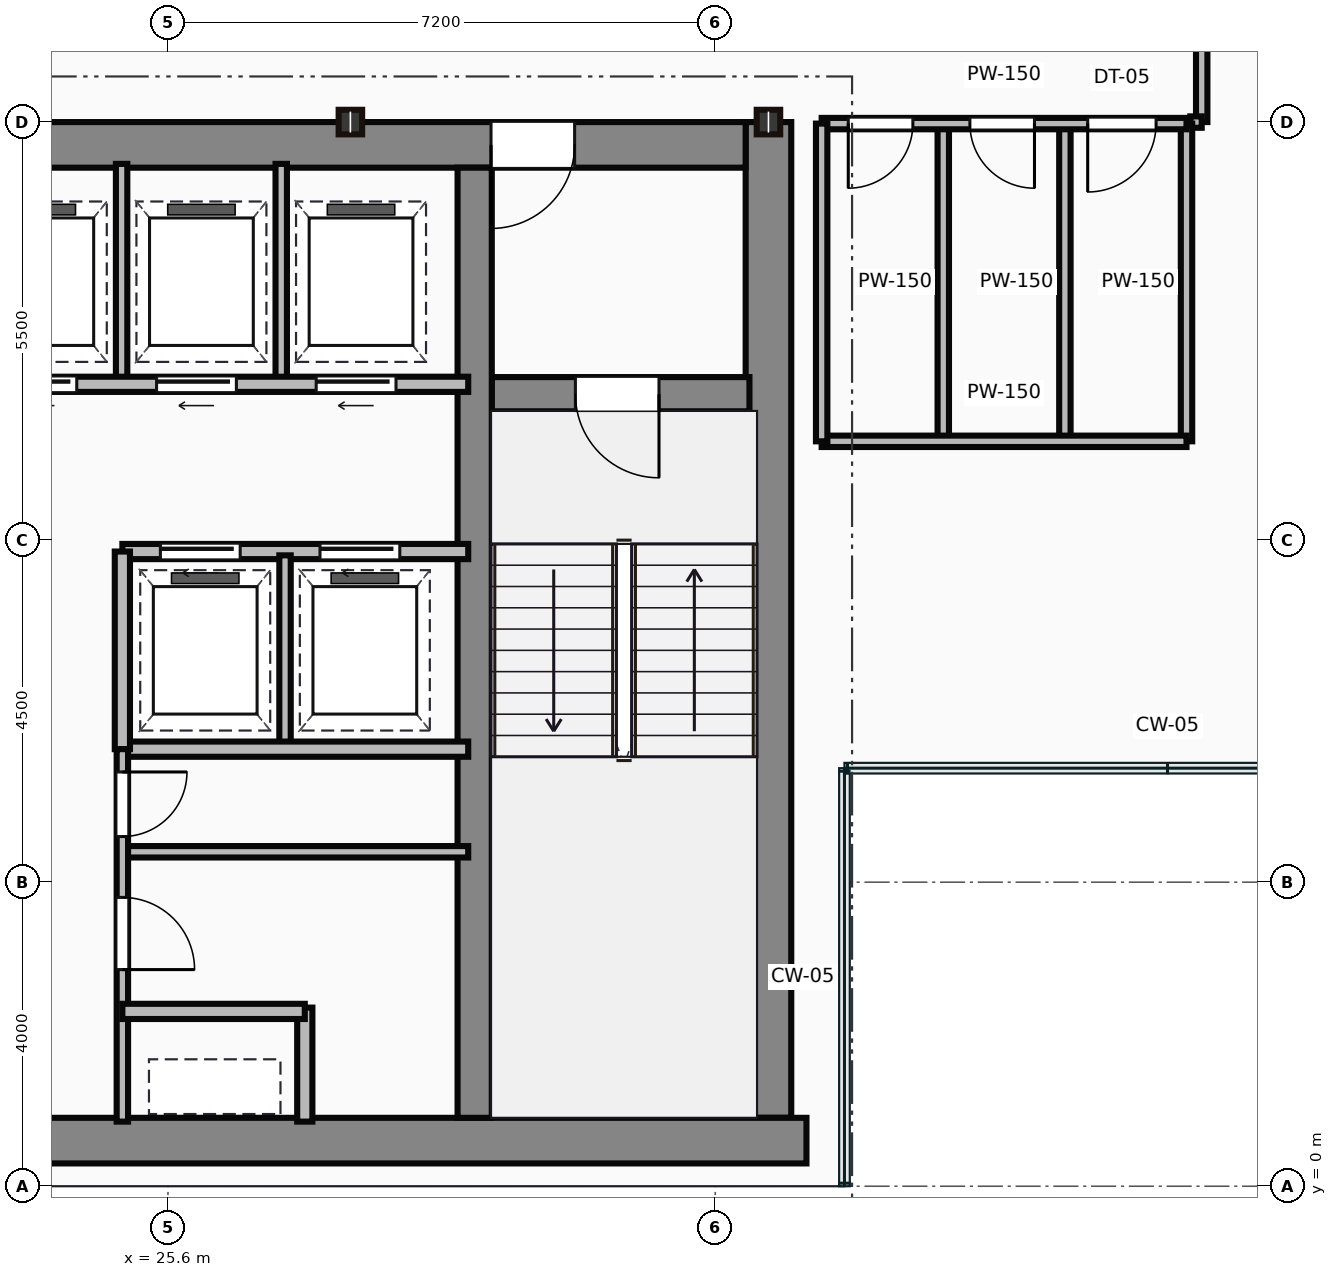
"""IFC4 building model, lengths in metres.
Left out: names, types, materials, properties, quantities, classifications, styles, units other than length and angle.
Written with IfcOpenShell. Run it as: python <this file> out.ifc"""

import sys

from ifc_helpers import new_model, si_unit, direction, frame, frame_2d, origin, origin_2d, place, context, subcontext, project, spatial, rectangle, i_section, extrude, source, transform, mapped, element, fill, save


model = new_model("IFC4")
c1 = context("Model", 3, precision=1e-05, world=origin(), true_north=direction((0.0, 1.0)))
c2 = subcontext(c1, "Body", "Model", "MODEL_VIEW")
j1 = project(units=[si_unit("LENGTHUNIT", "METRE"), si_unit("PLANEANGLEUNIT", "RADIAN")], contexts=[c1])
p1 = place(None, origin())
s1 = spatial("IfcSite", under=j1, at=p1, CompositionType="ELEMENT")
p2 = place(p1, origin())
s2 = spatial("IfcBuilding", under=s1, at=p2, CompositionType="ELEMENT")
p3 = place(p2, frame((0.0, 0.0, 214.15)))
s3 = spatial("IfcBuildingStorey", under=s2, at=p3, CompositionType="ELEMENT", Elevation=214.15)
m1 = source(origin(), c2, "Body", "SweptSolid", [
    extrude(rectangle(XDim=29.5, YDim=0.6, at=frame_2d((14.75, 0.0))), origin(), (0.0, 0.0, 1.0), 3.65),
])
p4 = place(p3, frame((4.5, 0.6, 0.0), z_axis=(0.0, 0.0, 1.0), x_axis=(1.0, 0.0, 0.0)))
e1 = element("IfcWall", 1, at=p4, inside=s3, PredefinedType="SHEAR", context=c2, shape_type="MappedRepresentation", body=[
    mapped(m1, transform((0.0, 0.0, 0.0))),
])
m2 = source(origin(), c2, "Body", "SweptSolid", [
    extrude(rectangle(XDim=13.1, YDim=0.6, at=frame_2d((6.55, 0.0))), origin(), (0.0, 0.0, 1.0), 3.65),
])
p5 = place(p3, frame((33.5, 0.9, 0.0), z_axis=(0.0, 0.0, 1.0), x_axis=(0.0, 1.0, 0.0)))
e2 = element("IfcWall", 2, at=p5, inside=s3, PredefinedType="SHEAR", context=c2, shape_type="MappedRepresentation", body=[
    mapped(m2, transform((0.0, 0.0, 0.0))),
])
m3 = source(origin(), c2, "Body", "SweptSolid", [
    extrude(rectangle(XDim=12.6, YDim=0.6, at=frame_2d((6.3, 0.0))), origin(), (0.0, 0.0, 1.0), 3.65),
])
p6 = place(p3, frame((20.6, 13.7, 0.0), z_axis=(0.0, 0.0, 1.0), x_axis=(1.0, 0.0, 0.0)))
e3 = element("IfcWall", 3, at=p6, inside=s3, PredefinedType="SHEAR", context=c2, shape_type="MappedRepresentation", body=[
    mapped(m3, transform((0.0, 0.0, 0.0))),
])
p7 = place(p6, frame((9.25, 0.0, 0.0)))
e4 = element("IfcOpeningElement", 4, at=p7, cuts=e3, PredefinedType="OPENING", context=c2, shape_type="SweptSolid", body=[
    extrude(rectangle(XDim=1.1, YDim=2.15, at=frame_2d((0.55, 1.075))), frame((0.0, 0.31, 0.0), z_axis=(0.0, -1.0, 0.0), x_axis=(1.0, 0.0, 0.0)), (0.0, 0.0, 1.0), 0.62),
])
m4 = source(origin(), c2, "Body", "SweptSolid", [
    extrude(rectangle(XDim=12.5, YDim=0.45, at=frame_2d((6.25, 0.0))), origin(), (0.0, 0.0, 1.0), 3.65),
])
p8 = place(p3, frame((29.635, 0.9, 0.0), z_axis=(0.0, 0.0, 1.0), x_axis=(0.0, 1.0, 0.0)))
e5 = element("IfcWall", 5, at=p8, inside=s3, PredefinedType="SHEAR", context=c2, shape_type="MappedRepresentation", body=[
    mapped(m4, transform((0.0, 0.0, 0.0))),
])
m5 = source(origin(), c2, "Body", "SweptSolid", [
    extrude(rectangle(XDim=3.39, YDim=0.45, at=frame_2d((1.695, 0.0))), origin(), (0.0, 0.0, 1.0), 3.65),
])
p9 = place(p3, frame((29.86, 10.42, 0.0), z_axis=(0.0, 0.0, 1.0), x_axis=(1.0, 0.0, 0.0)))
e6 = element("IfcWall", 6, at=p9, inside=s3, PredefinedType="SHEAR", context=c2, shape_type="MappedRepresentation", body=[
    mapped(m5, transform((0.0, 0.0, 0.0))),
])
p10 = place(p9, frame((1.1, 0.0, 0.0)))
e7 = element("IfcOpeningElement", 7, at=p10, cuts=e6, PredefinedType="OPENING", context=c2, shape_type="SweptSolid", body=[
    extrude(rectangle(XDim=1.1, YDim=2.15, at=frame_2d((0.55, 1.075))), frame((0.0, 0.235, 0.0), z_axis=(0.0, -1.0, 0.0), x_axis=(1.0, 0.0, 0.0)), (0.0, 0.0, 1.0), 0.47),
])
m6 = source(origin(), c2, "Body", "SweptSolid", [
    extrude(i_section(OverallWidth=0.309, OverallDepth=0.323, WebThickness=0.014, FlangeThickness=0.023, at=origin_2d()), origin(), (0.0, 0.0, 1.0), 3.65),
])
for number, where, z_axis, x_axis in (
    (8, (28.0, 14.0, 0.0), (0.0, 0.0, 1.0), (1.0, 0.0, 0.0)),
    (9, (33.5, 14.0, 0.0), (0.0, 0.0, 1.0), (1.0, 0.0, 0.0)),
):
    element("IfcColumn", number, at=place(p3, frame(where, z_axis=z_axis, x_axis=x_axis)), inside=s3, PredefinedType="COLUMN", context=c2, shape_type="MappedRepresentation", body=[
        mapped(m6, transform((0.0, 0.0, 0.0))),
    ])
m7 = source(origin(), c2, "Body", "SweptSolid", [
    extrude(rectangle(XDim=8.8, YDim=0.2, at=frame_2d((4.4, 0.0))), origin(), (0.0, 0.0, 1.0), 3.4),
])
p11 = place(p3, frame((20.75, 10.55, 0.0), z_axis=(0.0, 0.0, 1.0), x_axis=(1.0, 0.0, 0.0)))
e10 = element("IfcWall", 10, at=p11, inside=s3, PredefinedType="PARTITIONING", context=c2, shape_type="MappedRepresentation", body=[
    mapped(m7, transform((0.0, 0.0, 0.0))),
])
p12 = place(p11, frame((0.5, 0.0, 0.0)))
e11 = element("IfcOpeningElement", 11, at=p12, cuts=e10, PredefinedType="OPENING", context=c2, shape_type="SweptSolid", body=[
    extrude(rectangle(XDim=1.05, YDim=2.15, at=frame_2d((0.525, 1.075))), frame((0.0, 0.11, 0.0), z_axis=(0.0, -1.0, 0.0), x_axis=(1.0, 0.0, 0.0)), (0.0, 0.0, 1.0), 0.22),
])
p13 = place(p11, frame((2.6, 0.0, 0.0)))
e12 = element("IfcOpeningElement", 12, at=p13, cuts=e10, PredefinedType="OPENING", context=c2, shape_type="SweptSolid", body=[
    extrude(rectangle(XDim=1.05, YDim=2.15, at=frame_2d((0.525, 1.075))), frame((0.0, 0.11, 0.0), z_axis=(0.0, -1.0, 0.0), x_axis=(1.0, 0.0, 0.0)), (0.0, 0.0, 1.0), 0.22),
])
p14 = place(p11, frame((4.7, 0.0, 0.0)))
e13 = element("IfcOpeningElement", 13, at=p14, cuts=e10, PredefinedType="OPENING", context=c2, shape_type="SweptSolid", body=[
    extrude(rectangle(XDim=1.05, YDim=2.15, at=frame_2d((0.525, 1.075))), frame((0.0, 0.11, 0.0), z_axis=(0.0, -1.0, 0.0), x_axis=(1.0, 0.0, 0.0)), (0.0, 0.0, 1.0), 0.22),
])
p15 = place(p11, frame((6.8, 0.0, 0.0)))
e14 = element("IfcOpeningElement", 14, at=p15, cuts=e10, PredefinedType="OPENING", context=c2, shape_type="SweptSolid", body=[
    extrude(rectangle(XDim=1.05, YDim=2.15, at=frame_2d((0.525, 1.075))), frame((0.0, 0.11, 0.0), z_axis=(0.0, -1.0, 0.0), x_axis=(1.0, 0.0, 0.0)), (0.0, 0.0, 1.0), 0.22),
])
m8 = source(origin(), c2, "Body", "SweptSolid", [
    extrude(rectangle(XDim=2.85, YDim=0.15, at=frame_2d((1.425, 0.0))), origin(), (0.0, 0.0, 1.0), 3.4),
])
for number, where, z_axis, x_axis in (
    (15, (24.99, 10.6, 0.0), (0.0, 0.0, 1.0), (0.0, 1.0, 0.0)),
    (16, (27.09, 10.6, 0.0), (0.0, 0.0, 1.0), (0.0, 1.0, 0.0)),
):
    element("IfcWall", number, at=place(p3, frame(where, z_axis=z_axis, x_axis=x_axis)), inside=s3, PredefinedType="PARTITIONING", context=c2, shape_type="MappedRepresentation", body=[
        mapped(m8, transform((0.0, 0.0, 0.0))),
    ])
m9 = source(origin(), c2, "Body", "SweptSolid", [
    extrude(rectangle(XDim=4.55, YDim=0.2, at=frame_2d((2.275, 0.0))), origin(), (0.0, 0.0, 1.0), 3.4),
])
p16 = place(p3, frame((25.0, 8.35, 0.0), z_axis=(0.0, 0.0, 1.0), x_axis=(1.0, 0.0, 0.0)))
e17 = element("IfcWall", 17, at=p16, inside=s3, PredefinedType="PARTITIONING", context=c2, shape_type="MappedRepresentation", body=[
    mapped(m9, transform((0.0, 0.0, 0.0))),
])
p17 = place(p16, frame((0.5, 0.0, 0.0)))
e18 = element("IfcOpeningElement", 18, at=p17, cuts=e17, PredefinedType="OPENING", context=c2, shape_type="SweptSolid", body=[
    extrude(rectangle(XDim=1.05, YDim=2.15, at=frame_2d((0.525, 1.075))), frame((0.0, 0.11, 0.0), z_axis=(0.0, -1.0, 0.0), x_axis=(1.0, 0.0, 0.0)), (0.0, 0.0, 1.0), 0.22),
])
p18 = place(p16, frame((2.6, 0.0, 0.0)))
e19 = element("IfcOpeningElement", 19, at=p18, cuts=e17, PredefinedType="OPENING", context=c2, shape_type="SweptSolid", body=[
    extrude(rectangle(XDim=1.05, YDim=2.15, at=frame_2d((0.525, 1.075))), frame((0.0, 0.11, 0.0), z_axis=(0.0, -1.0, 0.0), x_axis=(1.0, 0.0, 0.0)), (0.0, 0.0, 1.0), 0.22),
])
p19 = place(p3, frame((25.0, 5.75, 0.0), z_axis=(0.0, 0.0, 1.0), x_axis=(1.0, 0.0, 0.0)))
e20 = element("IfcWall", 20, at=p19, inside=s3, PredefinedType="PARTITIONING", context=c2, shape_type="MappedRepresentation", body=[
    mapped(m9, transform((0.0, 0.0, 0.0))),
])
m10 = source(origin(), c2, "Body", "SweptSolid", [
    extrude(rectangle(XDim=2.6, YDim=0.2, at=frame_2d((1.3, 0.0))), origin(), (0.0, 0.0, 1.0), 3.4),
])
p20 = place(p3, frame((25.0, 5.75, 0.0), z_axis=(0.0, 0.0, 1.0), x_axis=(0.0, 1.0, 0.0)))
e21 = element("IfcWall", 21, at=p20, inside=s3, PredefinedType="PARTITIONING", context=c2, shape_type="MappedRepresentation", body=[
    mapped(m10, transform((0.0, 0.0, 0.0))),
])
m11 = source(origin(), c2, "Body", "SweptSolid", [
    extrude(rectangle(XDim=2.5, YDim=0.15, at=frame_2d((1.25, 0.0))), origin(), (0.0, 0.0, 1.0), 3.4),
])
p21 = place(p3, frame((27.14, 5.8, 0.0), z_axis=(0.0, 0.0, 1.0), x_axis=(0.0, 1.0, 0.0)))
e22 = element("IfcWall", 22, at=p21, inside=s3, PredefinedType="PARTITIONING", context=c2, shape_type="MappedRepresentation", body=[
    mapped(m11, transform((0.0, 0.0, 0.0))),
])
m12 = source(origin(), c2, "Body", "SweptSolid", [
    extrude(rectangle(XDim=4.9, YDim=0.15, at=frame_2d((2.45, 0.0))), origin(), (0.0, 0.0, 1.0), 3.4),
])
p22 = place(p3, frame((25.0, 0.85, 0.0), z_axis=(0.0, 0.0, 1.0), x_axis=(0.0, 1.0, 0.0)))
e23 = element("IfcWall", 23, at=p22, inside=s3, PredefinedType="PARTITIONING", context=c2, shape_type="MappedRepresentation", body=[
    mapped(m12, transform((0.0, 0.0, 0.0))),
])
p23 = place(p22, frame((2.0, 0.0, 0.0)))
e24 = element("IfcOpeningElement", 24, at=p23, cuts=e23, PredefinedType="OPENING", context=c2, shape_type="SweptSolid", body=[
    extrude(rectangle(XDim=0.95, YDim=2.15, at=frame_2d((0.475, 1.075))), frame((0.0, 0.085, 0.0), z_axis=(0.0, -1.0, 0.0), x_axis=(1.0, 0.0, 0.0)), (0.0, 0.0, 1.0), 0.17),
])
p24 = place(p22, frame((3.75, 0.0, 0.0)))
e25 = element("IfcOpeningElement", 25, at=p24, cuts=e23, PredefinedType="OPENING", context=c2, shape_type="SweptSolid", body=[
    extrude(rectangle(XDim=0.85, YDim=2.15, at=frame_2d((0.425, 1.075))), frame((0.0, 0.085, 0.0), z_axis=(0.0, -1.0, 0.0), x_axis=(1.0, 0.0, 0.0)), (0.0, 0.0, 1.0), 0.17),
])
m13 = source(origin(), c2, "Body", "SweptSolid", [
    extrude(rectangle(XDim=2.4, YDim=0.2, at=frame_2d((1.2, 0.0))), origin(), (0.0, 0.0, 1.0), 3.4),
])
p25 = place(p3, frame((25.0, 2.3, 0.0), z_axis=(0.0, 0.0, 1.0), x_axis=(1.0, 0.0, 0.0)))
e26 = element("IfcWall", 26, at=p25, inside=s3, PredefinedType="PARTITIONING", context=c2, shape_type="MappedRepresentation", body=[
    mapped(m13, transform((0.0, 0.0, 0.0))),
])
m14 = source(origin(), c2, "Body", "SweptSolid", [
    extrude(rectangle(XDim=1.5, YDim=0.2, at=frame_2d((0.75, 0.0))), origin(), (0.0, 0.0, 1.0), 3.4),
])
p26 = place(p3, frame((27.4, 0.85, 0.0), z_axis=(0.0, 0.0, 1.0), x_axis=(0.0, 1.0, 0.0)))
e27 = element("IfcWall", 27, at=p26, inside=s3, PredefinedType="PARTITIONING", context=c2, shape_type="MappedRepresentation", body=[
    mapped(m14, transform((0.0, 0.0, 0.0))),
])
m15 = source(origin(), c2, "Body", "SweptSolid", [
    extrude(rectangle(XDim=4.55, YDim=0.15, at=frame_2d((2.275, 0.0))), origin(), (0.0, 0.0, 1.0), 3.4),
])
p27 = place(p3, frame((25.0, 4.4, 0.0), z_axis=(0.0, 0.0, 1.0), x_axis=(1.0, 0.0, 0.0)))
e28 = element("IfcWall", 28, at=p27, inside=s3, PredefinedType="PARTITIONING", context=c2, shape_type="MappedRepresentation", body=[
    mapped(m15, transform((0.0, 0.0, 0.0))),
])
m16 = source(origin(), c2, "Body", "SweptSolid", [
    extrude(rectangle(XDim=4.8, YDim=0.15, at=frame_2d((2.4, 0.0))), origin(), (0.0, 0.0, 1.0), 2.787),
])
p28 = place(p3, frame((34.2, 13.98, 0.0), z_axis=(0.0, 0.0, 1.0), x_axis=(1.0, 0.0, 0.0)))
e29 = element("IfcWall", 29, at=p28, inside=s3, PredefinedType="PARTITIONING", context=c2, shape_type="MappedRepresentation", body=[
    mapped(m16, transform((0.0, 0.0, 0.0))),
])
p29 = place(p28, frame((0.35, 0.0, 0.0)))
e30 = element("IfcOpeningElement", 30, at=p29, cuts=e29, PredefinedType="OPENING", context=c2, shape_type="SweptSolid", body=[
    extrude(rectangle(XDim=0.85, YDim=2.1, at=frame_2d((0.425, 1.05))), frame((0.0, 0.085, 0.0), z_axis=(0.0, -1.0, 0.0), x_axis=(1.0, 0.0, 0.0)), (0.0, 0.0, 1.0), 0.17),
])
p30 = place(p28, frame((1.95, 0.0, 0.0)))
e31 = element("IfcOpeningElement", 31, at=p30, cuts=e29, PredefinedType="OPENING", context=c2, shape_type="SweptSolid", body=[
    extrude(rectangle(XDim=0.85, YDim=2.1, at=frame_2d((0.425, 1.05))), frame((0.0, 0.085, 0.0), z_axis=(0.0, -1.0, 0.0), x_axis=(1.0, 0.0, 0.0)), (0.0, 0.0, 1.0), 0.17),
])
p31 = place(p28, frame((3.5, 0.0, 0.0)))
e32 = element("IfcOpeningElement", 32, at=p31, cuts=e29, PredefinedType="OPENING", context=c2, shape_type="SweptSolid", body=[
    extrude(rectangle(XDim=0.9, YDim=2.1, at=frame_2d((0.45, 1.05))), frame((0.0, 0.085, 0.0), z_axis=(0.0, -1.0, 0.0), x_axis=(1.0, 0.0, 0.0)), (0.0, 0.0, 1.0), 0.17),
])
m17 = source(origin(), c2, "Body", "SweptSolid", [
    extrude(rectangle(XDim=4.8, YDim=0.15, at=frame_2d((2.4, 0.0))), origin(), (0.0, 0.0, 1.0), 3.4),
])
p32 = place(p3, frame((34.2, 9.8, 0.0), z_axis=(0.0, 0.0, 1.0), x_axis=(1.0, 0.0, 0.0)))
e33 = element("IfcWall", 33, at=p32, inside=s3, PredefinedType="PARTITIONING", context=c2, shape_type="MappedRepresentation", body=[
    mapped(m17, transform((0.0, 0.0, 0.0))),
])
m18 = source(origin(), c2, "Body", "SweptSolid", [
    extrude(rectangle(XDim=4.18, YDim=0.15, at=frame_2d((2.09, 0.0))), origin(), (0.0, 0.0, 1.0), 3.4),
])
for number, where, z_axis, x_axis in (
    (34, (39.0, 9.8, 0.0), (0.0, 0.0, 1.0), (0.0, 1.0, 0.0)),
    (35, (34.2, 9.8, 0.0), (0.0, 0.0, 1.0), (0.0, 1.0, 0.0)),
    (36, (35.8, 9.8, 0.0), (0.0, 0.0, 1.0), (0.0, 1.0, 0.0)),
    (37, (37.4, 9.8, 0.0), (0.0, 0.0, 1.0), (0.0, 1.0, 0.0)),
):
    element("IfcWall", number, at=place(p3, frame(where, z_axis=z_axis, x_axis=x_axis)), inside=s3, PredefinedType="PARTITIONING", context=c2, shape_type="MappedRepresentation", body=[
        mapped(m18, transform((0.0, 0.0, 0.0))),
    ])
m19 = source(origin(), c2, "Body", "SweptSolid", [
    extrude(rectangle(XDim=2.2, YDim=0.15, at=frame_2d((1.1, 0.0))), origin(), (0.0, 0.0, 1.0), 3.4),
])
p33 = place(p3, frame((39.2, 16.2, 0.0), z_axis=(0.0, 0.0, 1.0), x_axis=(0.0, -1.0, 0.0)))
e38 = element("IfcWall", 38, at=p33, inside=s3, PredefinedType="PARTITIONING", context=c2, shape_type="MappedRepresentation", body=[
    mapped(m19, transform((0.0, 0.0, 0.0))),
])
m20 = source(origin(), c2, "Body", "SweptSolid", [
    extrude(rectangle(XDim=0.15, YDim=0.15, at=frame_2d((0.075, 0.0))), origin(), (0.0, 0.0, 1.0), 3.4),
])
p34 = place(p3, frame((39.2, 14.0, 0.0), z_axis=(0.0, 0.0, 1.0), x_axis=(-1.0, 0.0, 0.0)))
e39 = element("IfcWall", 39, at=p34, inside=s3, PredefinedType="PARTITIONING", context=c2, shape_type="MappedRepresentation", body=[
    mapped(m20, transform((0.0, 0.0, 0.0))),
])
m21 = source(origin(), c2, "Body", "SweptSolid", [
    extrude(rectangle(XDim=1.1, YDim=2.15, at=frame_2d((0.55, 1.075))), frame((0.0, 0.025, 0.0), z_axis=(0.0, -1.0, 0.0), x_axis=(1.0, 0.0, 0.0)), (0.0, 0.0, 1.0), 0.05),
])
p35 = place(p10, frame((1.1, 0.0, 0.0), z_axis=(0.0, 0.0, 1.0), x_axis=(-1.0, 0.0, 0.0)))
e40 = element("IfcDoor", 40, at=p35, inside=s3, OperationType="SINGLE_SWING_RIGHT", PredefinedType="DOOR", context=c2, shape_type="MappedRepresentation", body=[
    mapped(m21, transform((0.0, 0.0, 0.0))),
])
fill(e7, e40)
p36 = place(p7, origin())
e41 = element("IfcDoor", 41, at=p36, inside=s3, OperationType="SINGLE_SWING_LEFT", PredefinedType="DOOR", context=c2, shape_type="MappedRepresentation", body=[
    mapped(m21, transform((0.0, 0.0, 0.0))),
])
fill(e4, e41)
m22 = source(origin(), c2, "Body", "SweptSolid", [
    extrude(rectangle(XDim=1.05, YDim=2.15, at=frame_2d((0.525, 1.075))), frame((0.0, 0.025, 0.0), z_axis=(0.0, -1.0, 0.0), x_axis=(1.0, 0.0, 0.0)), (0.0, 0.0, 1.0), 0.05),
])
p37 = place(p13, frame((1.05, 0.0, 0.0), z_axis=(0.0, 0.0, 1.0), x_axis=(-1.0, 0.0, 0.0)))
e42 = element("IfcDoor", 42, at=p37, inside=s3, OperationType="SLIDING_TO_LEFT", PredefinedType="DOOR", context=c2, shape_type="MappedRepresentation", body=[
    mapped(m22, transform((0.0, 0.0, 0.0))),
])
fill(e12, e42)
p38 = place(p14, frame((1.05, 0.0, 0.0), z_axis=(0.0, 0.0, 1.0), x_axis=(-1.0, 0.0, 0.0)))
e43 = element("IfcDoor", 43, at=p38, inside=s3, OperationType="SLIDING_TO_LEFT", PredefinedType="DOOR", context=c2, shape_type="MappedRepresentation", body=[
    mapped(m22, transform((0.0, 0.0, 0.0))),
])
fill(e13, e43)
p39 = place(p15, frame((1.05, 0.0, 0.0), z_axis=(0.0, 0.0, 1.0), x_axis=(-1.0, 0.0, 0.0)))
e44 = element("IfcDoor", 44, at=p39, inside=s3, OperationType="SLIDING_TO_LEFT", PredefinedType="DOOR", context=c2, shape_type="MappedRepresentation", body=[
    mapped(m22, transform((0.0, 0.0, 0.0))),
])
fill(e14, e44)
p40 = place(p17, origin())
e45 = element("IfcDoor", 45, at=p40, inside=s3, OperationType="SLIDING_TO_LEFT", PredefinedType="DOOR", context=c2, shape_type="MappedRepresentation", body=[
    mapped(m22, transform((0.0, 0.0, 0.0))),
])
fill(e18, e45)
p41 = place(p18, origin())
e46 = element("IfcDoor", 46, at=p41, inside=s3, OperationType="SLIDING_TO_LEFT", PredefinedType="DOOR", context=c2, shape_type="MappedRepresentation", body=[
    mapped(m22, transform((0.0, 0.0, 0.0))),
])
fill(e19, e46)
m23 = source(origin(), c2, "Body", "SweptSolid", [
    extrude(rectangle(XDim=0.95, YDim=2.15, at=frame_2d((0.475, 1.075))), frame((0.0, 0.025, 0.0), z_axis=(0.0, -1.0, 0.0), x_axis=(1.0, 0.0, 0.0)), (0.0, 0.0, 1.0), 0.05),
])
p42 = place(p23, origin())
e47 = element("IfcDoor", 47, at=p42, inside=s3, OperationType="SINGLE_SWING_LEFT", PredefinedType="DOOR", context=c2, shape_type="MappedRepresentation", body=[
    mapped(m23, transform((0.0, 0.0, 0.0))),
])
fill(e24, e47)
m24 = source(origin(), c2, "Body", "SweptSolid", [
    extrude(rectangle(XDim=0.85, YDim=2.15, at=frame_2d((0.425, 1.075))), frame((0.0, 0.025, 0.0), z_axis=(0.0, -1.0, 0.0), x_axis=(1.0, 0.0, 0.0)), (0.0, 0.0, 1.0), 0.05),
])
p43 = place(p24, origin())
e48 = element("IfcDoor", 48, at=p43, inside=s3, OperationType="SINGLE_SWING_RIGHT", PredefinedType="DOOR", context=c2, shape_type="MappedRepresentation", body=[
    mapped(m24, transform((0.0, 0.0, 0.0))),
])
fill(e25, e48)
m25 = source(origin(), c2, "Body", "SweptSolid", [
    extrude(rectangle(XDim=0.85, YDim=2.1, at=frame_2d((0.425, 1.05))), frame((0.0, 0.025, 0.0), z_axis=(0.0, -1.0, 0.0), x_axis=(1.0, 0.0, 0.0)), (0.0, 0.0, 1.0), 0.05),
])
p44 = place(p29, frame((0.85, 0.0, 0.0), z_axis=(0.0, 0.0, 1.0), x_axis=(-1.0, 0.0, 0.0)))
e49 = element("IfcDoor", 49, at=p44, inside=s3, OperationType="SINGLE_SWING_LEFT", PredefinedType="DOOR", context=c2, shape_type="MappedRepresentation", body=[
    mapped(m25, transform((0.0, 0.0, 0.0))),
])
fill(e30, e49)
p45 = place(p30, frame((0.85, 0.0, 0.0), z_axis=(0.0, 0.0, 1.0), x_axis=(-1.0, 0.0, 0.0)))
e50 = element("IfcDoor", 50, at=p45, inside=s3, OperationType="SINGLE_SWING_RIGHT", PredefinedType="DOOR", context=c2, shape_type="MappedRepresentation", body=[
    mapped(m25, transform((0.0, 0.0, 0.0))),
])
fill(e31, e50)
m26 = source(origin(), c2, "Body", "SweptSolid", [
    extrude(rectangle(XDim=0.9, YDim=2.1, at=frame_2d((0.45, 1.05))), frame((0.0, 0.025, 0.0), z_axis=(0.0, -1.0, 0.0), x_axis=(1.0, 0.0, 0.0)), (0.0, 0.0, 1.0), 0.05),
])
p46 = place(p31, frame((0.9, 0.0, 0.0), z_axis=(0.0, 0.0, 1.0), x_axis=(-1.0, 0.0, 0.0)))
e51 = element("IfcDoor", 51, at=p46, inside=s3, OperationType="SINGLE_SWING_LEFT", PredefinedType="DOOR", context=c2, shape_type="MappedRepresentation", body=[
    mapped(m26, transform((0.0, 0.0, 0.0))),
])
fill(e32, e51)
save(model, sys.argv[1])
